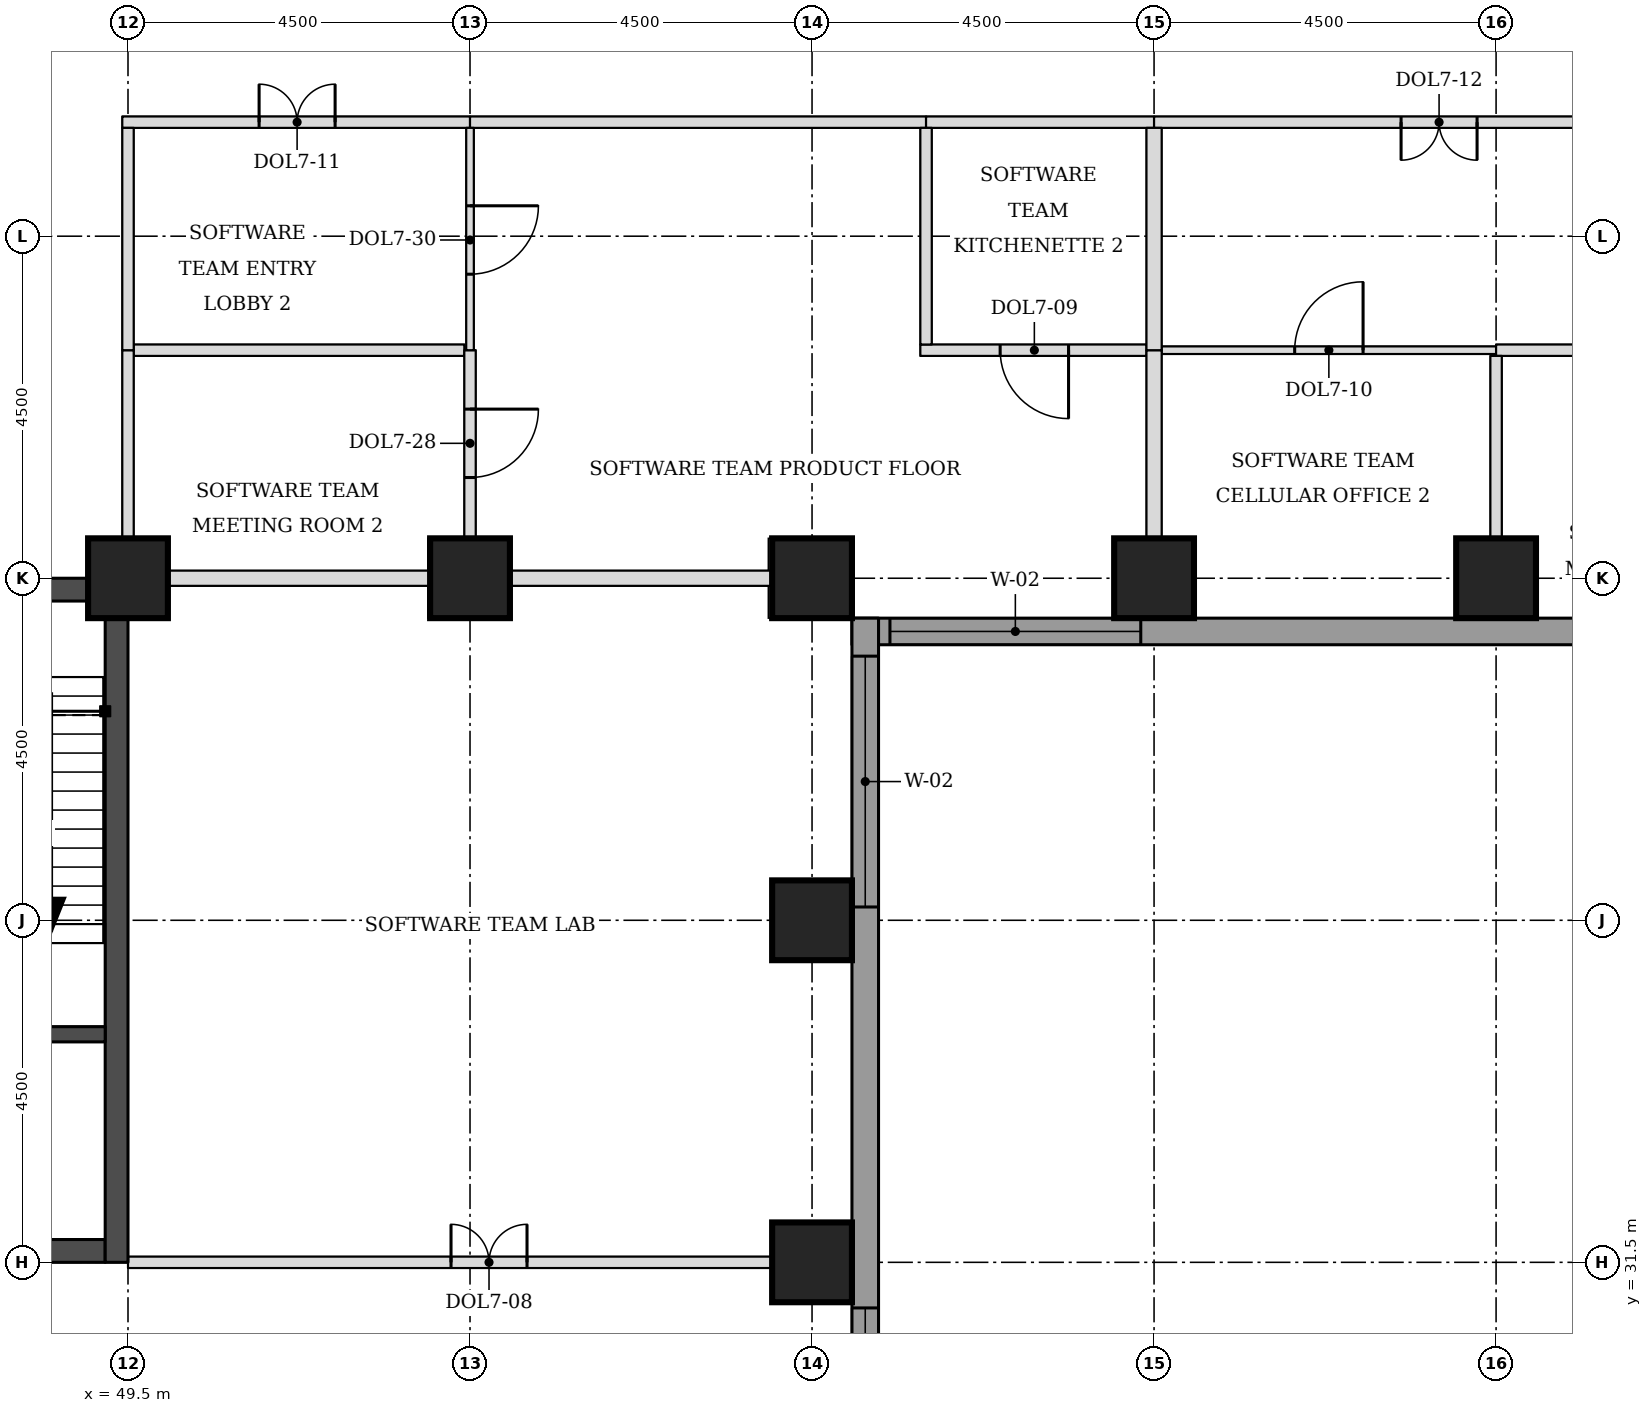
"""IFC4 building model, lengths in metres.
Left out: names, types, materials, properties, quantities, classifications, styles, units other than length and angle.
Written with IfcOpenShell. Run it as: python <this file> out.ifc"""

import sys

from ifc_helpers import new_model, si_unit, direction, frame, frame_2d, origin, origin_2d, place, context, subcontext, project, spatial, rectangle, extrude, element, fill, save


model = new_model("IFC4")
c1 = context("Model", 3, precision=1e-05, world=origin(), true_north=direction((0.0, 1.0)))
c2 = subcontext(c1, "Body", "Model", "MODEL_VIEW")
j1 = project(units=[si_unit("LENGTHUNIT", "METRE"), si_unit("PLANEANGLEUNIT", "RADIAN")], contexts=[c1])
p1 = place(None, origin())
s1 = spatial("IfcSite", under=j1, at=p1, CompositionType="ELEMENT")
p2 = place(p1, origin())
s2 = spatial("IfcBuilding", under=s1, at=p2, CompositionType="ELEMENT")
p3 = place(p2, frame((0.0, 0.0, 134.4)))
s3 = spatial("IfcBuildingStorey", under=s2, at=p3, CompositionType="ELEMENT", Elevation=134.4)
for number, where, z_axis, x_axis in (
    (1, (58.5, 31.5, 0.0), (0.0, 0.0, 1.0), (1.0, 0.0, 0.0)),
    (2, (58.5, 36.0, 0.0), (0.0, 0.0, 1.0), (1.0, 0.0, 0.0)),
    (3, (49.5, 40.5, 0.0), (0.0, 0.0, 1.0), (1.0, 0.0, 0.0)),
    (4, (54.0, 40.5, 0.0), (0.0, 0.0, 1.0), (1.0, 0.0, 0.0)),
    (5, (58.5, 40.5, 0.0), (0.0, 0.0, 1.0), (1.0, 0.0, 0.0)),
    (6, (63.0, 40.5, 0.0), (0.0, 0.0, 1.0), (1.0, 0.0, 0.0)),
    (7, (67.5, 40.5, 0.0), (0.0, 0.0, 1.0), (1.0, 0.0, 0.0)),
):
    element("IfcColumn", number, at=place(p3, frame(where, z_axis=z_axis, x_axis=x_axis)), inside=s3, PredefinedType="COLUMN", context=c2, shape_type="SweptSolid", body=[
        extrude(rectangle(XDim=1.05, YDim=1.05, at=origin_2d()), origin(), (0.0, 0.0, 1.0), 3.7),
    ])
p4 = place(p3, frame((40.8, 31.65, 0.0), z_axis=(0.0, 0.0, 1.0), x_axis=(1.0, 0.0, 0.0)))
e8 = element("IfcWall", 8, at=p4, inside=s3, PredefinedType="SHEAR", context=c2, shape_type="SweptSolid", body=[
    extrude(rectangle(XDim=8.4, YDim=0.3, at=frame_2d((4.2, 0.0))), origin(), (0.0, 0.0, 1.0), 3.7),
])
p5 = place(p4, frame((5.2, 0.0, 0.0)))
e9 = element("IfcOpeningElement", 9, at=p5, cuts=e8, PredefinedType="OPENING", context=c2, shape_type="SweptSolid", body=[
    extrude(rectangle(XDim=1.0, YDim=2.1, at=frame_2d((0.5, 1.05))), frame((0.0, 0.16, 0.0), z_axis=(0.0, -1.0, 0.0), x_axis=(1.0, 0.0, 0.0)), (0.0, 0.0, 1.0), 0.32),
])
p6 = place(p3, frame((40.8, 40.35, 0.0), z_axis=(0.0, 0.0, 1.0), x_axis=(1.0, 0.0, 0.0)))
e10 = element("IfcWall", 10, at=p6, inside=s3, PredefinedType="SHEAR", context=c2, shape_type="SweptSolid", body=[
    extrude(rectangle(XDim=8.4, YDim=0.3, at=frame_2d((4.2, 0.0))), origin(), (0.0, 0.0, 1.0), 3.7),
])
p7 = place(p6, frame((6.4, 0.0, 0.0)))
e11 = element("IfcOpeningElement", 11, at=p7, cuts=e10, PredefinedType="OPENING", context=c2, shape_type="SweptSolid", body=[
    extrude(rectangle(XDim=1.1, YDim=2.1, at=frame_2d((0.55, 1.05))), frame((0.0, 0.16, 0.0), z_axis=(0.0, -1.0, 0.0), x_axis=(1.0, 0.0, 0.0)), (0.0, 0.0, 1.0), 0.32),
])
p8 = place(p3, frame((49.35, 31.5, 0.0), z_axis=(0.0, 0.0, 1.0), x_axis=(0.0, 1.0, 0.0)))
e12 = element("IfcWall", 12, at=p8, inside=s3, PredefinedType="SHEAR", context=c2, shape_type="SweptSolid", body=[
    extrude(rectangle(XDim=9.0, YDim=0.3, at=frame_2d((4.5, 0.0))), origin(), (0.0, 0.0, 1.0), 3.7),
])
p9 = place(p3, frame((59.025, 39.8, 0.0), z_axis=(0.0, 0.0, 1.0), x_axis=(1.0, 0.0, 0.0)))
e13 = element("IfcWall", 13, at=p9, inside=s3, PredefinedType="STANDARD", context=c2, shape_type="SweptSolid", body=[
    extrude(rectangle(XDim=13.337, YDim=0.35, at=frame_2d((6.669, 0.0))), origin(), (0.0, 0.0, 1.0), 3.525),
])
p10 = place(p9, frame((0.5, 0.0, 0.9)))
e14 = element("IfcOpeningElement", 14, at=p10, cuts=e13, PredefinedType="OPENING", context=c2, shape_type="SweptSolid", body=[
    extrude(rectangle(XDim=3.3, YDim=1.9, at=frame_2d((1.65, 0.95))), frame((0.0, 0.185, 0.0), z_axis=(0.0, -1.0, 0.0), x_axis=(1.0, 0.0, 0.0)), (0.0, 0.0, 1.0), 0.37),
])
p11 = place(p3, frame((59.2, 22.138, 0.0), z_axis=(0.0, 0.0, 1.0), x_axis=(0.0, 1.0, 0.0)))
e15 = element("IfcWall", 15, at=p11, inside=s3, PredefinedType="STANDARD", context=c2, shape_type="SweptSolid", body=[
    extrude(rectangle(XDim=17.837, YDim=0.35, at=frame_2d((8.919, 0.0))), origin(), (0.0, 0.0, 1.0), 3.525),
])
p12 = place(p11, frame((5.462, 0.0, 0.9)))
e16 = element("IfcOpeningElement", 16, at=p12, cuts=e15, PredefinedType="OPENING", context=c2, shape_type="SweptSolid", body=[
    extrude(rectangle(XDim=3.3, YDim=1.9, at=frame_2d((1.65, 0.95))), frame((0.0, 0.185, 0.0), z_axis=(0.0, -1.0, 0.0), x_axis=(1.0, 0.0, 0.0)), (0.0, 0.0, 1.0), 0.37),
])
p13 = place(p11, frame((14.037, 0.0, 0.9)))
e17 = element("IfcOpeningElement", 17, at=p13, cuts=e15, PredefinedType="OPENING", context=c2, shape_type="SweptSolid", body=[
    extrude(rectangle(XDim=3.3, YDim=1.9, at=frame_2d((1.65, 0.95))), frame((0.0, 0.185, 0.0), z_axis=(0.0, -1.0, 0.0), x_axis=(1.0, 0.0, 0.0)), (0.0, 0.0, 1.0), 0.37),
])
p14 = place(p3, frame((49.5, 31.5, 0.0), z_axis=(0.0, 0.0, 1.0), x_axis=(1.0, 0.0, 0.0)))
e18 = element("IfcWall", 18, at=p14, inside=s3, PredefinedType="PARTITIONING", context=c2, shape_type="SweptSolid", body=[
    extrude(rectangle(XDim=9.525, YDim=0.15, at=frame_2d((4.762, 0.0))), origin(), (0.0, 0.0, 1.0), 2.55),
])
p15 = place(p14, frame((4.25, 0.0, 0.0)))
e19 = element("IfcOpeningElement", 19, at=p15, cuts=e18, PredefinedType="OPENING", context=c2, shape_type="SweptSolid", body=[
    extrude(rectangle(XDim=1.0, YDim=2.1, at=frame_2d((0.5, 1.05))), frame((0.0, 0.085, 0.0), z_axis=(0.0, -1.0, 0.0), x_axis=(1.0, 0.0, 0.0)), (0.0, 0.0, 1.0), 0.17),
])
p16 = place(p3, frame((50.015, 40.5, 0.0), z_axis=(0.0, 0.0, 1.0), x_axis=(1.0, 0.0, 0.0)))
e20 = element("IfcWall", 20, at=p16, inside=s3, PredefinedType="PARTITIONING", context=c2, shape_type="SweptSolid", body=[
    extrude(rectangle(XDim=3.46, YDim=0.2, at=frame_2d((1.73, 0.0))), origin(), (0.0, 0.0, 1.0), 2.8),
])
p17 = place(p3, frame((54.495, 40.5, 0.0), z_axis=(0.0, 0.0, 1.0), x_axis=(1.0, 0.0, 0.0)))
e21 = element("IfcWall", 21, at=p17, inside=s3, PredefinedType="PARTITIONING", context=c2, shape_type="SweptSolid", body=[
    extrude(rectangle(XDim=3.48, YDim=0.2, at=frame_2d((1.74, 0.0))), origin(), (0.0, 0.0, 1.0), 2.8),
])
p18 = place(p3, frame((49.575, 43.5, 0.0), z_axis=(0.0, 0.0, 1.0), x_axis=(1.0, 0.0, 0.0)))
e22 = element("IfcWall", 22, at=p18, inside=s3, PredefinedType="PARTITIONING", context=c2, shape_type="SweptSolid", body=[
    extrude(rectangle(XDim=4.35, YDim=0.15, at=frame_2d((2.175, 0.0))), origin(), (0.0, 0.0, 1.0), 3.55),
])
p19 = place(p3, frame((59.925, 43.5, 0.0), z_axis=(0.0, 0.0, 1.0), x_axis=(1.0, 0.0, 0.0)))
e23 = element("IfcWall", 23, at=p19, inside=s3, PredefinedType="PARTITIONING", context=c2, shape_type="SweptSolid", body=[
    extrude(rectangle(XDim=2.975, YDim=0.15, at=frame_2d((1.487, 0.0))), origin(), (0.0, 0.0, 1.0), 3.55),
])
p20 = place(p19, frame((1.05, 0.0, 0.0)))
e24 = element("IfcOpeningElement", 24, at=p20, cuts=e23, PredefinedType="OPENING", context=c2, shape_type="SweptSolid", body=[
    extrude(rectangle(XDim=0.9, YDim=2.1, at=frame_2d((0.45, 1.05))), frame((0.0, 0.085, 0.0), z_axis=(0.0, -1.0, 0.0), x_axis=(1.0, 0.0, 0.0)), (0.0, 0.0, 1.0), 0.17),
])
p21 = place(p3, frame((63.1, 43.5, 0.0), z_axis=(0.0, 0.0, 1.0), x_axis=(1.0, 0.0, 0.0)))
e25 = element("IfcWall", 25, at=p21, inside=s3, PredefinedType="PARTITIONING", context=c2, shape_type="SweptSolid", body=[
    extrude(rectangle(XDim=4.4, YDim=0.1, at=frame_2d((2.2, 0.0))), origin(), (0.0, 0.0, 1.0), 3.55),
])
p22 = place(p21, frame((1.75, 0.0, 0.0)))
e26 = element("IfcOpeningElement", 26, at=p22, cuts=e25, PredefinedType="OPENING", context=c2, shape_type="SweptSolid", body=[
    extrude(rectangle(XDim=0.9, YDim=2.1, at=frame_2d((0.45, 1.05))), frame((0.0, 0.06, 0.0), z_axis=(0.0, -1.0, 0.0), x_axis=(1.0, 0.0, 0.0)), (0.0, 0.0, 1.0), 0.12),
])
p23 = place(p3, frame((67.5, 43.5, 0.0), z_axis=(0.0, 0.0, 1.0), x_axis=(1.0, 0.0, 0.0)))
e27 = element("IfcWall", 27, at=p23, inside=s3, PredefinedType="PARTITIONING", context=c2, shape_type="SweptSolid", body=[
    extrude(rectangle(XDim=4.575, YDim=0.15, at=frame_2d((2.288, 0.0))), origin(), (0.0, 0.0, 1.0), 3.55),
])
p24 = place(p3, frame((49.425, 46.5, 0.0), z_axis=(0.0, 0.0, 1.0), x_axis=(1.0, 0.0, 0.0)))
e28 = element("IfcWall", 28, at=p24, inside=s3, PredefinedType="PARTITIONING", context=c2, shape_type="SweptSolid", body=[
    extrude(rectangle(XDim=4.575, YDim=0.15, at=frame_2d((2.288, 0.0))), origin(), (0.0, 0.0, 1.0), 3.55),
])
p25 = place(p24, frame((1.8, 0.0, 0.0)))
e29 = element("IfcOpeningElement", 29, at=p25, cuts=e28, PredefinedType="OPENING", context=c2, shape_type="SweptSolid", body=[
    extrude(rectangle(XDim=1.0, YDim=2.1, at=frame_2d((0.5, 1.05))), frame((0.0, 0.085, 0.0), z_axis=(0.0, -1.0, 0.0), x_axis=(1.0, 0.0, 0.0)), (0.0, 0.0, 1.0), 0.17),
])
p26 = place(p3, frame((54.0, 46.5, 0.0), z_axis=(0.0, 0.0, 1.0), x_axis=(1.0, 0.0, 0.0)))
e30 = element("IfcWall", 30, at=p26, inside=s3, PredefinedType="PARTITIONING", context=c2, shape_type="SweptSolid", body=[
    extrude(rectangle(XDim=6.0, YDim=0.15, at=frame_2d((3.0, 0.0))), origin(), (0.0, 0.0, 1.0), 3.55),
])
p27 = place(p3, frame((60.0, 46.5, 0.0), z_axis=(0.0, 0.0, 1.0), x_axis=(1.0, 0.0, 0.0)))
e31 = element("IfcWall", 31, at=p27, inside=s3, PredefinedType="PARTITIONING", context=c2, shape_type="SweptSolid", body=[
    extrude(rectangle(XDim=3.0, YDim=0.15, at=frame_2d((1.5, 0.0))), origin(), (0.0, 0.0, 1.0), 3.55),
])
p28 = place(p3, frame((63.0, 46.5, 0.0), z_axis=(0.0, 0.0, 1.0), x_axis=(1.0, 0.0, 0.0)))
e32 = element("IfcWall", 32, at=p28, inside=s3, PredefinedType="PARTITIONING", context=c2, shape_type="SweptSolid", body=[
    extrude(rectangle(XDim=7.5, YDim=0.15, at=frame_2d((3.75, 0.0))), origin(), (0.0, 0.0, 1.0), 3.55),
])
p29 = place(p28, frame((3.25, 0.0, 0.0)))
e33 = element("IfcOpeningElement", 33, at=p29, cuts=e32, PredefinedType="OPENING", context=c2, shape_type="SweptSolid", body=[
    extrude(rectangle(XDim=1.0, YDim=2.1, at=frame_2d((0.5, 1.05))), frame((0.0, 0.085, 0.0), z_axis=(0.0, -1.0, 0.0), x_axis=(1.0, 0.0, 0.0)), (0.0, 0.0, 1.0), 0.17),
])
p30 = place(p3, frame((63.0, 39.975, 0.0), z_axis=(0.0, 0.0, 1.0), x_axis=(0.0, 1.0, 0.0)))
e34 = element("IfcWall", 34, at=p30, inside=s3, PredefinedType="PARTITIONING", context=c2, shape_type="SweptSolid", body=[
    extrude(rectangle(XDim=3.525, YDim=0.2, at=frame_2d((1.762, 0.0))), origin(), (0.0, 0.0, 1.0), 3.55),
])
p31 = place(p3, frame((67.5, 39.975, 0.0), z_axis=(0.0, 0.0, 1.0), x_axis=(0.0, 1.0, 0.0)))
e35 = element("IfcWall", 35, at=p31, inside=s3, PredefinedType="PARTITIONING", context=c2, shape_type="SweptSolid", body=[
    extrude(rectangle(XDim=3.45, YDim=0.15, at=frame_2d((1.725, 0.0))), origin(), (0.0, 0.0, 1.0), 2.938),
])
p32 = place(p3, frame((49.5, 41.025, 0.0), z_axis=(0.0, 0.0, 1.0), x_axis=(0.0, 1.0, 0.0)))
e36 = element("IfcWall", 36, at=p32, inside=s3, PredefinedType="PARTITIONING", context=c2, shape_type="SweptSolid", body=[
    extrude(rectangle(XDim=2.475, YDim=0.15, at=frame_2d((1.238, 0.0))), origin(), (0.0, 0.0, 1.0), 3.55),
])
p33 = place(p3, frame((54.0, 41.025, 0.0), z_axis=(0.0, 0.0, 1.0), x_axis=(0.0, 1.0, 0.0)))
e37 = element("IfcWall", 37, at=p33, inside=s3, PredefinedType="PARTITIONING", context=c2, shape_type="SweptSolid", body=[
    extrude(rectangle(XDim=2.475, YDim=0.15, at=frame_2d((1.238, 0.0))), origin(), (0.0, 0.0, 1.0), 3.55),
])
p34 = place(p33, frame((0.8, 0.0, 0.0)))
e38 = element("IfcOpeningElement", 38, at=p34, cuts=e37, PredefinedType="OPENING", context=c2, shape_type="SweptSolid", body=[
    extrude(rectangle(XDim=0.9, YDim=2.1, at=frame_2d((0.45, 1.05))), frame((0.0, 0.085, 0.0), z_axis=(0.0, -1.0, 0.0), x_axis=(1.0, 0.0, 0.0)), (0.0, 0.0, 1.0), 0.17),
])
p35 = place(p3, frame((49.5, 43.5, 0.0), z_axis=(0.0, 0.0, 1.0), x_axis=(0.0, 1.0, 0.0)))
e39 = element("IfcWall", 39, at=p35, inside=s3, PredefinedType="PARTITIONING", context=c2, shape_type="SweptSolid", body=[
    extrude(rectangle(XDim=2.925, YDim=0.15, at=frame_2d((1.462, 0.0))), origin(), (0.0, 0.0, 1.0), 3.55),
])
p36 = place(p3, frame((54.0, 43.5, 0.0), z_axis=(0.0, 0.0, 1.0), x_axis=(0.0, 1.0, 0.0)))
e40 = element("IfcWall", 40, at=p36, inside=s3, PredefinedType="PARTITIONING", context=c2, shape_type="SweptSolid", body=[
    extrude(rectangle(XDim=2.925, YDim=0.1, at=frame_2d((1.462, 0.0))), origin(), (0.0, 0.0, 1.0), 3.55),
])
p37 = place(p36, frame((1.0, 0.0, 0.0)))
e41 = element("IfcOpeningElement", 41, at=p37, cuts=e40, PredefinedType="OPENING", context=c2, shape_type="SweptSolid", body=[
    extrude(rectangle(XDim=0.9, YDim=2.1, at=frame_2d((0.45, 1.05))), frame((0.0, 0.06, 0.0), z_axis=(0.0, -1.0, 0.0), x_axis=(1.0, 0.0, 0.0)), (0.0, 0.0, 1.0), 0.12),
])
p38 = place(p3, frame((63.0, 43.5, 0.0), z_axis=(0.0, 0.0, 1.0), x_axis=(0.0, 1.0, 0.0)))
e42 = element("IfcWall", 42, at=p38, inside=s3, PredefinedType="PARTITIONING", context=c2, shape_type="SweptSolid", body=[
    extrude(rectangle(XDim=2.925, YDim=0.2, at=frame_2d((1.462, 0.0))), origin(), (0.0, 0.0, 1.0), 3.55),
])
p39 = place(p3, frame((60.0, 43.575, 0.0), z_axis=(0.0, 0.0, 1.0), x_axis=(0.0, 1.0, 0.0)))
e43 = element("IfcWall", 43, at=p39, inside=s3, PredefinedType="PARTITIONING", context=c2, shape_type="SweptSolid", body=[
    extrude(rectangle(XDim=2.85, YDim=0.15, at=frame_2d((1.425, 0.0))), origin(), (0.0, 0.0, 1.0), 3.55),
])
p40 = place(p3, frame((46.2, 34.5, 0.0), z_axis=(0.0, 0.0, 1.0), x_axis=(1.0, 0.0, 0.0)))
e44 = element("IfcWall", 44, at=p40, inside=s3, PredefinedType="SOLIDWALL", context=c2, shape_type="SweptSolid", body=[
    extrude(rectangle(XDim=3.0, YDim=0.2, at=frame_2d((1.5, 0.0))), origin(), (0.0, 0.0, 1.0), 3.55),
])
p41 = place(p10, origin())
e45 = element("IfcWindow", 45, at=p41, inside=s3, PartitioningType="SINGLE_PANEL", PredefinedType="WINDOW", context=c2, shape_type="SweptSolid", body=[
    extrude(rectangle(XDim=3.3, YDim=1.9, at=frame_2d((1.65, 0.95))), frame((0.0, 0.085, 0.0), z_axis=(0.0, -1.0, 0.0), x_axis=(1.0, 0.0, 0.0)), (0.0, 0.0, 1.0), 0.06),
])
fill(e14, e45)
p42 = place(p12, origin())
e46 = element("IfcWindow", 46, at=p42, inside=s3, PartitioningType="SINGLE_PANEL", PredefinedType="WINDOW", context=c2, shape_type="SweptSolid", body=[
    extrude(rectangle(XDim=3.3, YDim=1.9, at=frame_2d((1.65, 0.95))), frame((0.0, 0.085, 0.0), z_axis=(0.0, -1.0, 0.0), x_axis=(1.0, 0.0, 0.0)), (0.0, 0.0, 1.0), 0.06),
])
fill(e16, e46)
p43 = place(p13, origin())
e47 = element("IfcWindow", 47, at=p43, inside=s3, PartitioningType="SINGLE_PANEL", PredefinedType="WINDOW", context=c2, shape_type="SweptSolid", body=[
    extrude(rectangle(XDim=3.3, YDim=1.9, at=frame_2d((1.65, 0.95))), frame((0.0, 0.085, 0.0), z_axis=(0.0, -1.0, 0.0), x_axis=(1.0, 0.0, 0.0)), (0.0, 0.0, 1.0), 0.06),
])
fill(e17, e47)
p44 = place(p15, origin())
e48 = element("IfcDoor", 48, at=p44, inside=s3, OperationType="DOUBLE_DOOR_SINGLE_SWING", PredefinedType="DOOR", context=c2, shape_type="SweptSolid", body=[
    extrude(rectangle(XDim=1.0, YDim=2.1, at=frame_2d((0.5, 1.05))), frame((0.0, 0.025, 0.0), z_axis=(0.0, -1.0, 0.0), x_axis=(1.0, 0.0, 0.0)), (0.0, 0.0, 1.0), 0.05),
])
fill(e19, e48)
p45 = place(p25, origin())
e49 = element("IfcDoor", 49, at=p45, inside=s3, OperationType="DOUBLE_DOOR_SINGLE_SWING", PredefinedType="DOOR", context=c2, shape_type="SweptSolid", body=[
    extrude(rectangle(XDim=1.0, YDim=2.1, at=frame_2d((0.5, 1.05))), frame((0.0, 0.025, 0.0), z_axis=(0.0, -1.0, 0.0), x_axis=(1.0, 0.0, 0.0)), (0.0, 0.0, 1.0), 0.05),
])
fill(e29, e49)
p46 = place(p37, frame((0.9, 0.0, 0.0), z_axis=(0.0, 0.0, 1.0), x_axis=(-1.0, 0.0, 0.0)))
e50 = element("IfcDoor", 50, at=p46, inside=s3, OperationType="SINGLE_SWING_LEFT", PredefinedType="DOOR", context=c2, shape_type="SweptSolid", body=[
    extrude(rectangle(XDim=0.9, YDim=2.1, at=frame_2d((0.45, 1.05))), frame((0.0, 0.025, 0.0), z_axis=(0.0, -1.0, 0.0), x_axis=(1.0, 0.0, 0.0)), (0.0, 0.0, 1.0), 0.05),
])
fill(e41, e50)
p47 = place(p20, frame((0.9, 0.0, 0.0), z_axis=(0.0, 0.0, 1.0), x_axis=(-1.0, 0.0, 0.0)))
e51 = element("IfcDoor", 51, at=p47, inside=s3, OperationType="SINGLE_SWING_LEFT", PredefinedType="DOOR", context=c2, shape_type="SweptSolid", body=[
    extrude(rectangle(XDim=0.9, YDim=2.1, at=frame_2d((0.45, 1.05))), frame((0.0, 0.025, 0.0), z_axis=(0.0, -1.0, 0.0), x_axis=(1.0, 0.0, 0.0)), (0.0, 0.0, 1.0), 0.05),
])
fill(e24, e51)
p48 = place(p34, frame((0.9, 0.0, 0.0), z_axis=(0.0, 0.0, 1.0), x_axis=(-1.0, 0.0, 0.0)))
e52 = element("IfcDoor", 52, at=p48, inside=s3, OperationType="SINGLE_SWING_LEFT", PredefinedType="DOOR", context=c2, shape_type="SweptSolid", body=[
    extrude(rectangle(XDim=0.9, YDim=2.1, at=frame_2d((0.45, 1.05))), frame((0.0, 0.025, 0.0), z_axis=(0.0, -1.0, 0.0), x_axis=(1.0, 0.0, 0.0)), (0.0, 0.0, 1.0), 0.05),
])
fill(e38, e52)
p49 = place(p29, frame((1.0, 0.0, 0.0), z_axis=(0.0, 0.0, 1.0), x_axis=(-1.0, 0.0, 0.0)))
e53 = element("IfcDoor", 53, at=p49, inside=s3, OperationType="DOUBLE_DOOR_SINGLE_SWING", PredefinedType="DOOR", context=c2, shape_type="SweptSolid", body=[
    extrude(rectangle(XDim=1.0, YDim=2.1, at=frame_2d((0.5, 1.05))), frame((0.0, 0.025, 0.0), z_axis=(0.0, -1.0, 0.0), x_axis=(1.0, 0.0, 0.0)), (0.0, 0.0, 1.0), 0.05),
])
fill(e33, e53)
p50 = place(p22, origin())
e54 = element("IfcDoor", 54, at=p50, inside=s3, OperationType="SINGLE_SWING_RIGHT", PredefinedType="DOOR", context=c2, shape_type="SweptSolid", body=[
    extrude(rectangle(XDim=0.9, YDim=2.1, at=frame_2d((0.45, 1.05))), frame((0.0, 0.025, 0.0), z_axis=(0.0, -1.0, 0.0), x_axis=(1.0, 0.0, 0.0)), (0.0, 0.0, 1.0), 0.05),
])
fill(e26, e54)
save(model, sys.argv[1])
